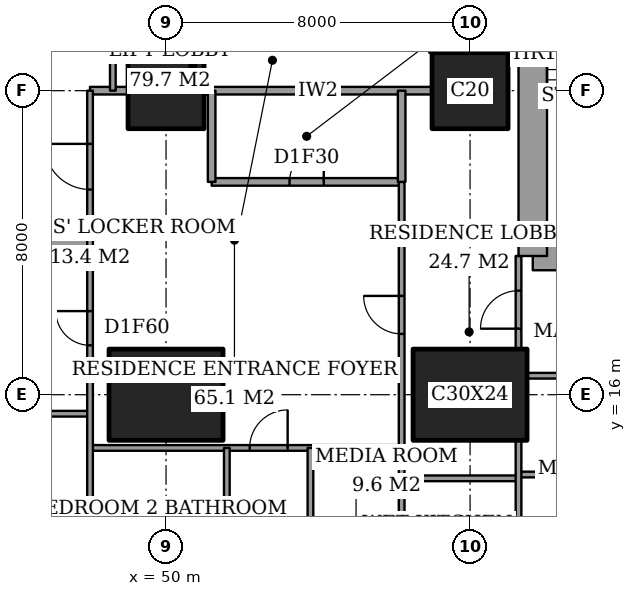
"""IFC4 building model, lengths in metres.
Left out: names, types, materials, properties, quantities, classifications, styles, units other than length and angle.
Written with IfcOpenShell. Run it as: python <this file> out.ifc"""

import sys

from ifc_helpers import new_model, si_unit, direction, frame, frame_2d, origin, origin_2d, place, context, subcontext, project, spatial, rectangle, extrude, element, fill, save


model = new_model("IFC4")
c1 = context("Model", 3, precision=1e-05, world=origin(), true_north=direction((0.0, 1.0)))
c2 = subcontext(c1, "Body", "Model", "MODEL_VIEW")
j1 = project(units=[si_unit("LENGTHUNIT", "METRE"), si_unit("PLANEANGLEUNIT", "RADIAN")], contexts=[c1])
p1 = place(None, origin())
s1 = spatial("IfcSite", under=j1, at=p1, CompositionType="ELEMENT")
p2 = place(p1, origin())
s2 = spatial("IfcBuilding", under=s1, at=p2, CompositionType="ELEMENT")
p3 = place(p2, frame((0.0, 0.0, 36.8)))
s3 = spatial("IfcBuildingStorey", under=s2, at=p3, CompositionType="ELEMENT", Elevation=36.8)
p4 = place(p3, frame((50.0, 16.0, 0.0), z_axis=(0.0, 0.0, 1.0), x_axis=(1.0, 0.0, 0.0)))
e1 = element("IfcColumn", 1, at=p4, inside=s3, PredefinedType="COLUMN", context=c2, shape_type="SweptSolid", body=[
    extrude(rectangle(XDim=3.0, YDim=2.4, at=origin_2d()), origin(), (0.0, 0.0, 1.0), 3.6),
])
p5 = place(p3, frame((50.0, 24.0, 0.0), z_axis=(0.0, 0.0, 1.0), x_axis=(1.0, 0.0, 0.0)))
e2 = element("IfcColumn", 2, at=p5, inside=s3, PredefinedType="COLUMN", context=c2, shape_type="SweptSolid", body=[
    extrude(rectangle(XDim=2.0, YDim=2.0, at=origin_2d()), origin(), (0.0, 0.0, 1.0), 3.6),
])
p6 = place(p3, frame((58.0, 16.0, 0.0), z_axis=(0.0, 0.0, 1.0), x_axis=(1.0, 0.0, 0.0)))
e3 = element("IfcColumn", 3, at=p6, inside=s3, PredefinedType="COLUMN", context=c2, shape_type="SweptSolid", body=[
    extrude(rectangle(XDim=3.0, YDim=2.4, at=origin_2d()), origin(), (0.0, 0.0, 1.0), 3.6),
])
p7 = place(p3, frame((58.0, 24.0, 0.0), z_axis=(0.0, 0.0, 1.0), x_axis=(1.0, 0.0, 0.0)))
e4 = element("IfcColumn", 4, at=p7, inside=s3, PredefinedType="COLUMN", context=c2, shape_type="SweptSolid", body=[
    extrude(rectangle(XDim=2.0, YDim=2.0, at=origin_2d()), origin(), (0.0, 0.0, 1.0), 3.6),
])
p8 = place(p3, frame((59.65, 19.65, 0.0), z_axis=(0.0, 0.0, 1.0), x_axis=(1.0, 0.0, 0.0)))
e5 = element("IfcWall", 5, at=p8, inside=s3, PredefinedType="SHEAR", context=c2, shape_type="SweptSolid", body=[
    extrude(rectangle(XDim=4.45, YDim=0.75, at=frame_2d((2.225, 0.0))), origin(), (0.0, 0.0, 1.0), 3.6),
])
p9 = place(p3, frame((59.65, 28.35, 0.0), z_axis=(0.0, 0.0, 1.0), x_axis=(0.0, -1.0, 0.0)))
e6 = element("IfcWall", 6, at=p9, inside=s3, PredefinedType="SHEAR", context=c2, shape_type="SweptSolid", body=[
    extrude(rectangle(XDim=8.7, YDim=0.75, at=frame_2d((4.35, 0.0))), origin(), (0.0, 0.0, 1.0), 3.6),
])
p10 = place(p9, frame((0.975, 0.0, 0.0)))
e7 = element("IfcOpeningElement", 7, at=p10, cuts=e6, PredefinedType="OPENING", context=c2, shape_type="SweptSolid", body=[
    extrude(rectangle(XDim=1.0, YDim=2.1, at=frame_2d((0.5, 1.05))), frame((0.0, 0.385, 0.0), z_axis=(0.0, -1.0, 0.0), x_axis=(1.0, 0.0, 0.0)), (0.0, 0.0, 1.0), 0.77),
])
p11 = place(p3, frame((56.2, 13.8, 0.0), z_axis=(0.0, 0.0, 1.0), x_axis=(1.0, 0.0, 0.0)))
e8 = element("IfcWall", 8, at=p11, inside=s3, PredefinedType="PARTITIONING", context=c2, shape_type="SweptSolid", body=[
    extrude(rectangle(XDim=3.075, YDim=0.15, at=frame_2d((1.538, 0.0))), origin(), (0.0, 0.0, 1.0), 3.35),
])
p12 = place(p3, frame((59.275, 13.9, 0.0), z_axis=(0.0, 0.0, 1.0), x_axis=(1.0, 0.0, 0.0)))
e9 = element("IfcWall", 9, at=p12, inside=s3, PredefinedType="PARTITIONING", context=c2, shape_type="SweptSolid", body=[
    extrude(rectangle(XDim=2.4, YDim=0.15, at=frame_2d((1.2, 0.0))), origin(), (0.0, 0.0, 1.0), 3.35),
])
p13 = place(p3, frame((48.0, 14.6, 0.0), z_axis=(0.0, 0.0, 1.0), x_axis=(1.0, 0.0, 0.0)))
e10 = element("IfcWall", 10, at=p13, inside=s3, PredefinedType="PARTITIONING", context=c2, shape_type="SweptSolid", body=[
    extrude(rectangle(XDim=8.2, YDim=0.15, at=frame_2d((4.1, 0.0))), origin(), (0.0, 0.0, 1.0), 3.35),
])
p14 = place(p13, frame((4.2, 0.0, 0.0)))
e11 = element("IfcOpeningElement", 11, at=p14, cuts=e10, PredefinedType="OPENING", context=c2, shape_type="SweptSolid", body=[
    extrude(rectangle(XDim=1.0, YDim=2.1, at=frame_2d((0.5, 1.05))), frame((0.0, 0.085, 0.0), z_axis=(0.0, -1.0, 0.0), x_axis=(1.0, 0.0, 0.0)), (0.0, 0.0, 1.0), 0.17),
])
p15 = place(p3, frame((42.0, 15.5, 0.0), z_axis=(0.0, 0.0, 1.0), x_axis=(1.0, 0.0, 0.0)))
e12 = element("IfcWall", 12, at=p15, inside=s3, PredefinedType="PARTITIONING", context=c2, shape_type="SweptSolid", body=[
    extrude(rectangle(XDim=6.0, YDim=0.15, at=frame_2d((3.0, 0.0))), origin(), (0.0, 0.0, 1.0), 3.35),
])
p16 = place(p3, frame((59.5, 16.5, 0.0), z_axis=(0.0, 0.0, 1.0), x_axis=(1.0, 0.0, 0.0)))
e13 = element("IfcWall", 13, at=p16, inside=s3, PredefinedType="PARTITIONING", context=c2, shape_type="SweptSolid", body=[
    extrude(rectangle(XDim=5.15, YDim=0.15, at=frame_2d((2.575, 0.0))), origin(), (0.0, 0.0, 1.0), 3.35),
])
p17 = place(p3, frame((42.0, 20.0, 0.0), z_axis=(0.0, 0.0, 1.0), x_axis=(1.0, 0.0, 0.0)))
e14 = element("IfcWall", 14, at=p17, inside=s3, PredefinedType="PARTITIONING", context=c2, shape_type="SweptSolid", body=[
    extrude(rectangle(XDim=6.0, YDim=0.2, at=frame_2d((3.0, 0.0))), origin(), (0.0, 0.0, 1.0), 3.35),
])
p18 = place(p3, frame((51.2, 21.6, 0.0), z_axis=(0.0, 0.0, 1.0), x_axis=(1.0, 0.0, 0.0)))
e15 = element("IfcWall", 15, at=p18, inside=s3, PredefinedType="PARTITIONING", context=c2, shape_type="SweptSolid", body=[
    extrude(rectangle(XDim=5.0, YDim=0.2, at=frame_2d((2.5, 0.0))), origin(), (0.0, 0.0, 1.0), 3.35),
])
p19 = place(p18, frame((2.05, 0.0, 0.0)))
e16 = element("IfcOpeningElement", 16, at=p19, cuts=e15, PredefinedType="OPENING", context=c2, shape_type="SweptSolid", body=[
    extrude(rectangle(XDim=0.9, YDim=2.1, at=frame_2d((0.45, 1.05))), frame((0.0, 0.11, 0.0), z_axis=(0.0, -1.0, 0.0), x_axis=(1.0, 0.0, 0.0)), (0.0, 0.0, 1.0), 0.22),
])
p20 = place(p3, frame((48.0, 24.0, 0.0), z_axis=(0.0, 0.0, 1.0), x_axis=(1.0, 0.0, 0.0)))
e17 = element("IfcWall", 17, at=p20, inside=s3, PredefinedType="PARTITIONING", context=c2, shape_type="SweptSolid", body=[
    extrude(rectangle(XDim=1.0, YDim=0.2, at=frame_2d((0.5, 0.0))), origin(), (0.0, 0.0, 1.0), 3.35),
])
p21 = place(p3, frame((51.0, 24.0, 0.0), z_axis=(0.0, 0.0, 1.0), x_axis=(1.0, 0.0, 0.0)))
e18 = element("IfcWall", 18, at=p21, inside=s3, PredefinedType="PARTITIONING", context=c2, shape_type="SweptSolid", body=[
    extrude(rectangle(XDim=6.0, YDim=0.2, at=frame_2d((3.0, 0.0))), origin(), (0.0, 0.0, 1.0), 3.35),
])
p22 = place(p3, frame((48.0, 10.6, 0.0), z_axis=(0.0, 0.0, 1.0), x_axis=(0.0, 1.0, 0.0)))
e19 = element("IfcWall", 19, at=p22, inside=s3, PredefinedType="PARTITIONING", context=c2, shape_type="SweptSolid", body=[
    extrude(rectangle(XDim=13.4, YDim=0.15, at=frame_2d((6.7, 0.0))), origin(), (0.0, 0.0, 1.0), 3.35),
])
p23 = place(p22, frame((10.8, 0.0, 0.0)))
e20 = element("IfcOpeningElement", 20, at=p23, cuts=e19, PredefinedType="OPENING", context=c2, shape_type="SweptSolid", body=[
    extrude(rectangle(XDim=1.2, YDim=2.4, at=frame_2d((0.6, 1.2))), frame((0.0, 0.085, 0.0), z_axis=(0.0, -1.0, 0.0), x_axis=(1.0, 0.0, 0.0)), (0.0, 0.0, 1.0), 0.17),
])
p24 = place(p22, frame((6.7, 0.0, 0.0)))
e21 = element("IfcOpeningElement", 21, at=p24, cuts=e19, PredefinedType="OPENING", context=c2, shape_type="SweptSolid", body=[
    extrude(rectangle(XDim=0.9, YDim=2.1, at=frame_2d((0.45, 1.05))), frame((0.0, 0.085, 0.0), z_axis=(0.0, -1.0, 0.0), x_axis=(1.0, 0.0, 0.0)), (0.0, 0.0, 1.0), 0.17),
])
p25 = place(p3, frame((48.6, 24.0, 0.0), z_axis=(0.0, 0.0, 1.0), x_axis=(0.0, 1.0, 0.0)))
e22 = element("IfcWall", 22, at=p25, inside=s3, PredefinedType="PARTITIONING", context=c2, shape_type="SweptSolid", body=[
    extrude(rectangle(XDim=1.6, YDim=0.15, at=frame_2d((0.8, 0.0))), origin(), (0.0, 0.0, 1.0), 3.35),
])
p26 = place(p3, frame((51.2, 21.6, 0.0), z_axis=(0.0, 0.0, 1.0), x_axis=(0.0, 1.0, 0.0)))
e23 = element("IfcWall", 23, at=p26, inside=s3, PredefinedType="PARTITIONING", context=c2, shape_type="SweptSolid", body=[
    extrude(rectangle(XDim=2.4, YDim=0.2, at=frame_2d((1.2, 0.0))), origin(), (0.0, 0.0, 1.0), 3.35),
])
for number, where, z_axis, x_axis in (
    (24, (51.6, 10.6, 0.0), (0.0, 0.0, 1.0), (0.0, 1.0, 0.0)),
    (25, (53.8, 10.6, 0.0), (0.0, 0.0, 1.0), (0.0, 1.0, 0.0)),
):
    element("IfcWall", number, at=place(p3, frame(where, z_axis=z_axis, x_axis=x_axis)), inside=s3, PredefinedType="PARTITIONING", context=c2, shape_type="SweptSolid", body=[
        extrude(rectangle(XDim=4.0, YDim=0.15, at=frame_2d((2.0, 0.0))), origin(), (0.0, 0.0, 1.0), 3.35),
    ])
p27 = place(p3, frame((56.2, 21.6, 0.0), z_axis=(0.0, 0.0, 1.0), x_axis=(0.0, 1.0, 0.0)))
e26 = element("IfcWall", 26, at=p27, inside=s3, PredefinedType="PARTITIONING", context=c2, shape_type="SweptSolid", body=[
    extrude(rectangle(XDim=2.4, YDim=0.2, at=frame_2d((1.2, 0.0))), origin(), (0.0, 0.0, 1.0), 3.35),
])
p28 = place(p3, frame((56.2, 10.6, 0.0), z_axis=(0.0, 0.0, 1.0), x_axis=(0.0, 1.0, 0.0)))
e27 = element("IfcWall", 27, at=p28, inside=s3, PredefinedType="PARTITIONING", context=c2, shape_type="SweptSolid", body=[
    extrude(rectangle(XDim=11.0, YDim=0.15, at=frame_2d((5.5, 0.0))), origin(), (0.0, 0.0, 1.0), 3.35),
])
p29 = place(p28, frame((7.0, 0.0, 0.0)))
e28 = element("IfcOpeningElement", 28, at=p29, cuts=e27, PredefinedType="OPENING", context=c2, shape_type="SweptSolid", body=[
    extrude(rectangle(XDim=1.0, YDim=2.1, at=frame_2d((0.5, 1.05))), frame((0.0, 0.085, 0.0), z_axis=(0.0, -1.0, 0.0), x_axis=(1.0, 0.0, 0.0)), (0.0, 0.0, 1.0), 0.17),
])
p30 = place(p3, frame((59.275, 10.6, 0.0), z_axis=(0.0, 0.0, 1.0), x_axis=(0.0, 1.0, 0.0)))
e29 = element("IfcWall", 29, at=p30, inside=s3, PredefinedType="PARTITIONING", context=c2, shape_type="SweptSolid", body=[
    extrude(rectangle(XDim=4.2, YDim=0.15, at=frame_2d((2.1, 0.0))), origin(), (0.0, 0.0, 1.0), 3.35),
])
p31 = place(p3, frame((59.275, 17.2, 0.0), z_axis=(0.0, 0.0, 1.0), x_axis=(0.0, 1.0, 0.0)))
e30 = element("IfcWall", 30, at=p31, inside=s3, PredefinedType="PARTITIONING", context=c2, shape_type="SweptSolid", body=[
    extrude(rectangle(XDim=2.45, YDim=0.15, at=frame_2d((1.225, 0.0))), origin(), (0.0, 0.0, 1.0), 3.35),
])
p32 = place(p31, frame((0.538, 0.0, 0.0)))
e31 = element("IfcOpeningElement", 31, at=p32, cuts=e30, PredefinedType="OPENING", context=c2, shape_type="SweptSolid", body=[
    extrude(rectangle(XDim=1.0, YDim=2.1, at=frame_2d((0.5, 1.05))), frame((0.0, 0.085, 0.0), z_axis=(0.0, -1.0, 0.0), x_axis=(1.0, 0.0, 0.0)), (0.0, 0.0, 1.0), 0.17),
])
p33 = place(p32, origin())
e32 = element("IfcDoor", 32, at=p33, inside=s3, OperationType="SINGLE_SWING_RIGHT", PredefinedType="DOOR", context=c2, shape_type="SweptSolid", body=[
    extrude(rectangle(XDim=1.0, YDim=2.1, at=frame_2d((0.5, 1.05))), frame((0.0, 0.025, 0.0), z_axis=(0.0, -1.0, 0.0), x_axis=(1.0, 0.0, 0.0)), (0.0, 0.0, 1.0), 0.05),
])
fill(e31, e32)
p34 = place(p29, origin())
e33 = element("IfcDoor", 33, at=p34, inside=s3, OperationType="SINGLE_SWING_LEFT", PredefinedType="DOOR", context=c2, shape_type="SweptSolid", body=[
    extrude(rectangle(XDim=1.0, YDim=2.1, at=frame_2d((0.5, 1.05))), frame((0.0, 0.025, 0.0), z_axis=(0.0, -1.0, 0.0), x_axis=(1.0, 0.0, 0.0)), (0.0, 0.0, 1.0), 0.05),
])
fill(e28, e33)
p35 = place(p19, origin())
e34 = element("IfcDoor", 34, at=p35, inside=s3, OperationType="SINGLE_SWING_LEFT", PredefinedType="DOOR", context=c2, shape_type="SweptSolid", body=[
    extrude(rectangle(XDim=0.9, YDim=2.1, at=frame_2d((0.45, 1.05))), frame((0.0, 0.025, 0.0), z_axis=(0.0, -1.0, 0.0), x_axis=(1.0, 0.0, 0.0)), (0.0, 0.0, 1.0), 0.05),
])
fill(e16, e34)
p36 = place(p23, origin())
e35 = element("IfcDoor", 35, at=p36, inside=s3, OperationType="SINGLE_SWING_LEFT", PredefinedType="DOOR", context=c2, shape_type="SweptSolid", body=[
    extrude(rectangle(XDim=1.2, YDim=2.4, at=frame_2d((0.6, 1.2))), frame((0.0, 0.025, 0.0), z_axis=(0.0, -1.0, 0.0), x_axis=(1.0, 0.0, 0.0)), (0.0, 0.0, 1.0), 0.05),
])
fill(e20, e35)
p37 = place(p14, origin())
e36 = element("IfcDoor", 36, at=p37, inside=s3, OperationType="SINGLE_SWING_LEFT", PredefinedType="DOOR", context=c2, shape_type="SweptSolid", body=[
    extrude(rectangle(XDim=1.0, YDim=2.1, at=frame_2d((0.5, 1.05))), frame((0.0, 0.025, 0.0), z_axis=(0.0, -1.0, 0.0), x_axis=(1.0, 0.0, 0.0)), (0.0, 0.0, 1.0), 0.05),
])
fill(e11, e36)
p38 = place(p24, origin())
e37 = element("IfcDoor", 37, at=p38, inside=s3, OperationType="SINGLE_SWING_LEFT", PredefinedType="DOOR", context=c2, shape_type="SweptSolid", body=[
    extrude(rectangle(XDim=0.9, YDim=2.1, at=frame_2d((0.45, 1.05))), frame((0.0, 0.025, 0.0), z_axis=(0.0, -1.0, 0.0), x_axis=(1.0, 0.0, 0.0)), (0.0, 0.0, 1.0), 0.05),
])
fill(e21, e37)
save(model, sys.argv[1])
